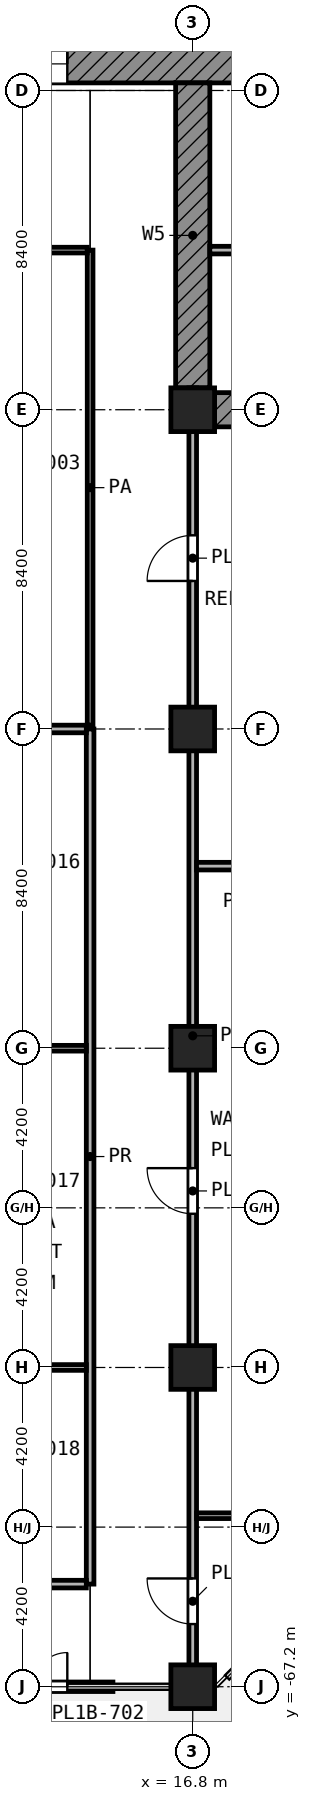
"""IFC4 building model, lengths in metres.
Left out: names, types, materials, properties, quantities, classifications, styles, units other than length and angle.
Written with IfcOpenShell. Run it as: python <this file> out.ifc"""

import sys

from ifc_helpers import new_model, si_unit, direction, frame, frame_2d, origin, origin_2d, place, context, subcontext, project, spatial, rectangle, extrude, element, fill, save


model = new_model("IFC4")
c1 = context("Model", 3, precision=1e-05, world=origin(), true_north=direction((0.0, 1.0)))
c2 = subcontext(c1, "Body", "Model", "MODEL_VIEW")
j1 = project(units=[si_unit("LENGTHUNIT", "METRE"), si_unit("PLANEANGLEUNIT", "RADIAN")], contexts=[c1])
p1 = place(None, origin())
s1 = spatial("IfcSite", under=j1, at=p1, CompositionType="ELEMENT")
p2 = place(p1, origin())
s2 = spatial("IfcBuilding", under=s1, at=p2, CompositionType="ELEMENT")
p3 = place(p2, frame((0.0, 0.0, 93.8)))
s3 = spatial("IfcBuildingStorey", under=s2, at=p3, CompositionType="ELEMENT", Elevation=93.8)
for number, where, z_axis, x_axis in (
    (1, (16.8, -33.6, 0.0), (0.0, 0.0, 1.0), (1.0, 0.0, 0.0)),
    (2, (16.8, -42.0, 0.0), (0.0, 0.0, 1.0), (1.0, 0.0, 0.0)),
    (3, (16.8, -50.4, 0.0), (0.0, 0.0, 1.0), (1.0, 0.0, 0.0)),
    (4, (16.8, -58.8, 0.0), (0.0, 0.0, 1.0), (1.0, 0.0, 0.0)),
    (5, (16.8, -67.2, 0.0), (0.0, 0.0, 1.0), (1.0, 0.0, 0.0)),
):
    element("IfcColumn", number, at=place(p3, frame(where, z_axis=z_axis, x_axis=x_axis)), inside=s3, PredefinedType="COLUMN", context=c2, shape_type="SweptSolid", body=[
        extrude(rectangle(XDim=1.15, YDim=1.15, at=origin_2d()), origin(), (0.0, 0.0, 1.0), 5.0),
    ])
p4 = place(p3, frame((16.8, -25.0, 0.0), z_axis=(0.0, 0.0, 1.0), x_axis=(0.0, -1.0, 0.0)))
e6 = element("IfcWall", 6, at=p4, inside=s3, PredefinedType="SHEAR", context=c2, shape_type="SweptSolid", body=[
    extrude(rectangle(XDim=8.025, YDim=0.9, at=frame_2d((4.012, 0.0))), origin(), (0.0, 0.0, 1.0), 4.4),
])
p5 = place(p3, frame((17.375, -33.6, 0.0), z_axis=(0.0, 0.0, 1.0), x_axis=(1.0, 0.0, 0.0)))
e7 = element("IfcWall", 7, at=p5, inside=s3, PredefinedType="SHEAR", context=c2, shape_type="SweptSolid", body=[
    extrude(rectangle(XDim=3.325, YDim=0.9, at=frame_2d((1.663, 0.0))), origin(), (0.0, 0.0, 1.0), 4.4),
])
p6 = place(p3, frame((10.5, -67.201, 0.0), z_axis=(0.0, 0.0, 1.0), x_axis=(1.0, 0.0, 0.0)))
e8 = element("IfcWall", 8, at=p6, inside=s3, PredefinedType="SOLIDWALL", context=c2, shape_type="SweptSolid", body=[
    extrude(rectangle(XDim=4.2, YDim=0.25, at=frame_2d((2.1, 0.0))), origin(), (0.0, 0.0, 1.0), 4.24),
])
p7 = place(p6, frame((1.2, 0.0, 0.0)))
e9 = element("IfcOpeningElement", 9, at=p7, cuts=e8, PredefinedType="OPENING", context=c2, shape_type="SweptSolid", body=[
    extrude(rectangle(XDim=1.8, YDim=2.1, at=frame_2d((0.9, 1.05))), frame((0.0, 0.135, 0.0), z_axis=(0.0, -1.0, 0.0), x_axis=(1.0, 0.0, 0.0)), (0.0, 0.0, 1.0), 0.27),
])
p8 = place(p3, frame((5.4, -24.5, 0.0), z_axis=(0.0, 0.0, 1.0), x_axis=(1.0, 0.0, 0.0)))
e10 = element("IfcWall", 10, at=p8, inside=s3, PredefinedType="SHEAR", context=c2, shape_type="SweptSolid", body=[
    extrude(rectangle(XDim=18.6, YDim=1.0, at=frame_2d((9.3, 0.0))), origin(), (0.0, 0.0, 1.0), 4.4),
])
p9 = place(p8, frame((6.3, 0.0, 0.0)))
e11 = element("IfcOpeningElement", 11, at=p9, cuts=e10, PredefinedType="OPENING", context=c2, shape_type="SweptSolid", body=[
    extrude(rectangle(XDim=1.8, YDim=2.1, at=frame_2d((0.9, 1.05))), frame((0.0, 0.51, 0.0), z_axis=(0.0, -1.0, 0.0), x_axis=(1.0, 0.0, 0.0)), (0.0, 0.0, 1.0), 1.02),
])
p10 = place(p3, frame((16.9, -62.7, 0.0), z_axis=(0.0, 0.0, 1.0), x_axis=(1.0, 0.0, 0.0)))
e12 = element("IfcWall", 12, at=p10, inside=s3, PredefinedType="PARTITIONING", context=c2, shape_type="SweptSolid", body=[
    extrude(rectangle(XDim=4.02, YDim=0.15, at=frame_2d((2.01, 0.0))), origin(), (0.0, 0.0, 1.0), 4.4),
])
for number, where, z_axis, x_axis in (
    (13, (11.2, -58.8, 0.0), (0.0, 0.0, 1.0), (1.0, 0.0, 0.0)),
    (14, (11.2, -50.4, 0.0), (0.0, 0.0, 1.0), (1.0, 0.0, 0.0)),
):
    element("IfcWall", number, at=place(p3, frame(where, z_axis=z_axis, x_axis=x_axis)), inside=s3, PredefinedType="PARTITIONING", context=c2, shape_type="SweptSolid", body=[
        extrude(rectangle(XDim=2.8, YDim=0.15, at=frame_2d((1.4, 0.0))), origin(), (0.0, 0.0, 1.0), 4.4),
    ])
p11 = place(p3, frame((11.178, -29.4, 0.0), z_axis=(0.0, 0.0, 1.0), x_axis=(1.0, 0.0, 0.0)))
e15 = element("IfcWall", 15, at=p11, inside=s3, PredefinedType="PARTITIONING", context=c2, shape_type="SweptSolid", body=[
    extrude(rectangle(XDim=2.847, YDim=0.15, at=frame_2d((1.423, 0.0))), origin(), (0.0, 0.0, 1.0), 4.4),
])
p12 = place(p3, frame((14.1, -41.9, 0.0), z_axis=(0.0, 0.0, 1.0), x_axis=(0.0, 1.0, 0.0)))
e16 = element("IfcWall", 16, at=p12, inside=s3, PredefinedType="PARTITIONING", context=c2, shape_type="SweptSolid", body=[
    extrude(rectangle(XDim=12.5, YDim=0.15, at=frame_2d((6.25, 0.0))), origin(), (0.0, 0.0, 1.0), 4.4),
])
p13 = place(p3, frame((11.203, -64.5, 0.0), z_axis=(0.0, 0.0, 1.0), x_axis=(1.0, 0.0, 0.0)))
e17 = element("IfcWall", 17, at=p13, inside=s3, PredefinedType="PARTITIONING", context=c2, shape_type="SweptSolid", body=[
    extrude(rectangle(XDim=2.797, YDim=0.2, at=frame_2d((1.398, 0.0))), origin(), (0.0, 0.0, 1.0), 4.4),
])
p14 = place(p3, frame((16.9, -45.609, 0.0), z_axis=(0.0, 0.0, 1.0), x_axis=(1.0, 0.0, 0.0)))
e18 = element("IfcWall", 18, at=p14, inside=s3, PredefinedType="PARTITIONING", context=c2, shape_type="SweptSolid", body=[
    extrude(rectangle(XDim=4.02, YDim=0.2, at=frame_2d((2.01, 0.0))), origin(), (0.0, 0.0, 1.0), 4.4),
])
p15 = place(p3, frame((11.2, -42.0, 0.0), z_axis=(0.0, 0.0, 1.0), x_axis=(1.0, 0.0, 0.0)))
e19 = element("IfcWall", 19, at=p15, inside=s3, PredefinedType="PARTITIONING", context=c2, shape_type="SweptSolid", body=[
    extrude(rectangle(XDim=2.8, YDim=0.2, at=frame_2d((1.4, 0.0))), origin(), (0.0, 0.0, 1.0), 4.4),
])
p16 = place(p3, frame((17.249, -29.4, 0.0), z_axis=(0.0, 0.0, 1.0), x_axis=(1.0, 0.0, 0.0)))
e20 = element("IfcWall", 20, at=p16, inside=s3, PredefinedType="PARTITIONING", context=c2, shape_type="SweptSolid", body=[
    extrude(rectangle(XDim=3.698, YDim=0.2, at=frame_2d((1.849, 0.0))), origin(), (0.0, 0.0, 1.0), 4.4),
])
p17 = place(p3, frame((14.1, -64.5, 0.0), z_axis=(0.0, 0.0, 1.0), x_axis=(0.0, 1.0, 0.0)))
e21 = element("IfcWall", 21, at=p17, inside=s3, PredefinedType="PARTITIONING", context=c2, shape_type="SweptSolid", body=[
    extrude(rectangle(XDim=22.5, YDim=0.2, at=frame_2d((11.25, 0.0))), origin(), (0.0, 0.0, 1.0), 4.4),
])
p18 = place(p3, frame((16.8, -67.121, 0.0), z_axis=(0.0, 0.0, 1.0), x_axis=(0.0, 1.0, 0.0)))
e22 = element("IfcWall", 22, at=p18, inside=s3, PredefinedType="PARTITIONING", context=c2, shape_type="SweptSolid", body=[
    extrude(rectangle(XDim=34.096, YDim=0.2, at=frame_2d((17.048, 0.0))), origin(), (0.0, 0.0, 1.0), 4.4),
])
p19 = place(p18, frame((29.016, 0.0, 0.0)))
e23 = element("IfcOpeningElement", 23, at=p19, cuts=e22, PredefinedType="OPENING", context=c2, shape_type="SweptSolid", body=[
    extrude(rectangle(XDim=1.2, YDim=2.1, at=frame_2d((0.6, 1.05))), frame((0.0, 0.11, 0.0), z_axis=(0.0, -1.0, 0.0), x_axis=(1.0, 0.0, 0.0)), (0.0, 0.0, 1.0), 0.22),
])
p20 = place(p18, frame((12.366, 0.0, 0.0)))
e24 = element("IfcOpeningElement", 24, at=p20, cuts=e22, PredefinedType="OPENING", context=c2, shape_type="SweptSolid", body=[
    extrude(rectangle(XDim=1.2, YDim=2.1, at=frame_2d((0.6, 1.05))), frame((0.0, 0.11, 0.0), z_axis=(0.0, -1.0, 0.0), x_axis=(1.0, 0.0, 0.0)), (0.0, 0.0, 1.0), 0.22),
])
p21 = place(p18, frame((1.57, 0.0, 0.0)))
e25 = element("IfcOpeningElement", 25, at=p21, cuts=e22, PredefinedType="OPENING", context=c2, shape_type="SweptSolid", body=[
    extrude(rectangle(XDim=1.2, YDim=2.1, at=frame_2d((0.6, 1.05))), frame((0.0, 0.11, 0.0), z_axis=(0.0, -1.0, 0.0), x_axis=(1.0, 0.0, 0.0)), (0.0, 0.0, 1.0), 0.22),
])
p22 = place(p7, origin())
e26 = element("IfcDoor", 26, at=p22, inside=s3, OperationType="DOUBLE_DOOR_SINGLE_SWING", PredefinedType="DOOR", context=c2, shape_type="SweptSolid", body=[
    extrude(rectangle(XDim=1.8, YDim=2.1, at=frame_2d((0.9, 1.05))), frame((0.0, 0.025, 0.0), z_axis=(0.0, -1.0, 0.0), x_axis=(1.0, 0.0, 0.0)), (0.0, 0.0, 1.0), 0.05),
])
fill(e9, e26)
p23 = place(p9, origin())
e27 = element("IfcDoor", 27, at=p23, inside=s3, OperationType="DOUBLE_DOOR_SINGLE_SWING", PredefinedType="DOOR", context=c2, shape_type="SweptSolid", body=[
    extrude(rectangle(XDim=1.8, YDim=2.1, at=frame_2d((0.9, 1.05))), frame((0.0, 0.025, 0.0), z_axis=(0.0, -1.0, 0.0), x_axis=(1.0, 0.0, 0.0)), (0.0, 0.0, 1.0), 0.05),
])
fill(e11, e27)
p24 = place(p19, origin())
e28 = element("IfcDoor", 28, at=p24, inside=s3, OperationType="SINGLE_SWING_LEFT", PredefinedType="DOOR", context=c2, shape_type="SweptSolid", body=[
    extrude(rectangle(XDim=1.2, YDim=2.1, at=frame_2d((0.6, 1.05))), frame((0.0, 0.025, 0.0), z_axis=(0.0, -1.0, 0.0), x_axis=(1.0, 0.0, 0.0)), (0.0, 0.0, 1.0), 0.05),
])
fill(e23, e28)
p25 = place(p20, origin())
e29 = element("IfcDoor", 29, at=p25, inside=s3, OperationType="SINGLE_SWING_RIGHT", PredefinedType="DOOR", context=c2, shape_type="SweptSolid", body=[
    extrude(rectangle(XDim=1.2, YDim=2.1, at=frame_2d((0.6, 1.05))), frame((0.0, 0.025, 0.0), z_axis=(0.0, -1.0, 0.0), x_axis=(1.0, 0.0, 0.0)), (0.0, 0.0, 1.0), 0.05),
])
fill(e24, e29)
p26 = place(p21, origin())
e30 = element("IfcDoor", 30, at=p26, inside=s3, OperationType="SINGLE_SWING_RIGHT", PredefinedType="DOOR", context=c2, shape_type="SweptSolid", body=[
    extrude(rectangle(XDim=1.2, YDim=2.1, at=frame_2d((0.6, 1.05))), frame((0.0, 0.025, 0.0), z_axis=(0.0, -1.0, 0.0), x_axis=(1.0, 0.0, 0.0)), (0.0, 0.0, 1.0), 0.05),
])
fill(e25, e30)
save(model, sys.argv[1])
